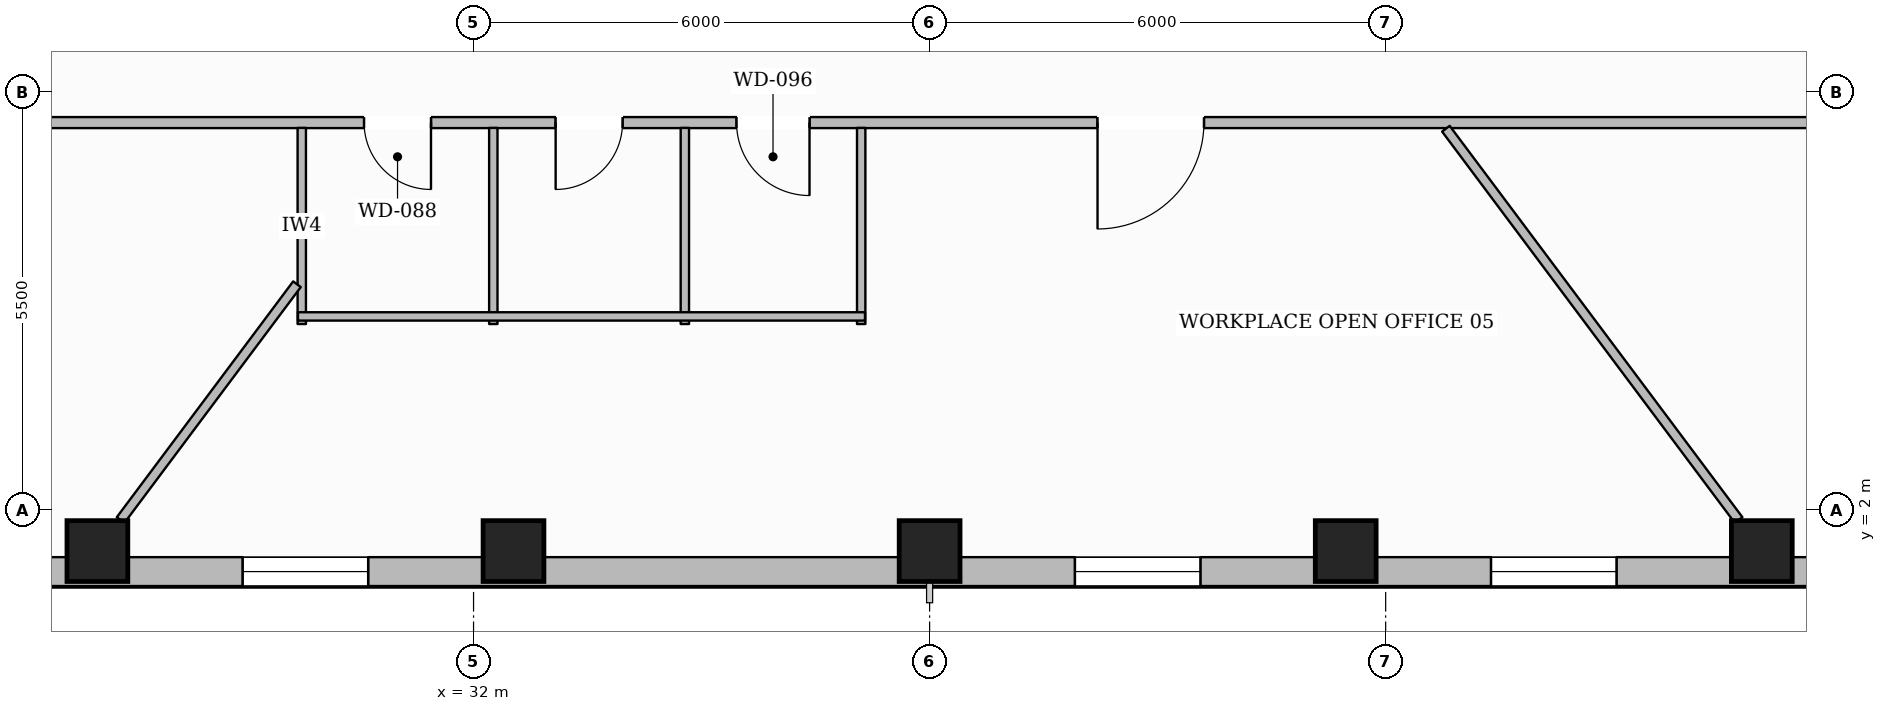
"""IFC4 building model, lengths in metres.
Left out: names, types, materials, properties, quantities, classifications, styles, units other than length and angle.
Written with IfcOpenShell. Run it as: python <this file> out.ifc"""

import sys

from ifc_helpers import new_model, si_unit, direction, frame, frame_2d, origin, origin_2d, place, context, subcontext, project, spatial, rectangle, hollow_rectangle, extrude, element, fill, save


model = new_model("IFC4")
c1 = context("Model", 3, precision=1e-05, world=origin(), true_north=direction((0.0, 1.0)))
c2 = subcontext(c1, "Body", "Model", "MODEL_VIEW")
j1 = project(units=[si_unit("LENGTHUNIT", "METRE"), si_unit("PLANEANGLEUNIT", "RADIAN")], contexts=[c1])
p1 = place(None, origin())
s1 = spatial("IfcSite", under=j1, at=p1, CompositionType="ELEMENT")
p2 = place(p1, origin())
s2 = spatial("IfcBuilding", under=s1, at=p2, CompositionType="ELEMENT")
p3 = place(p2, frame((0.0, 0.0, 25.25)))
s3 = spatial("IfcBuildingStorey", under=s2, at=p3, CompositionType="ELEMENT", Elevation=25.25)
for number, where, z_axis, x_axis in (
    (1, (27.051, 1.463, 0.0), (0.0, 0.0, 1.0), (1.0, 0.0, 0.0)),
    (2, (32.526, 1.463, 0.0), (0.0, 0.0, 1.0), (1.0, 0.0, 0.0)),
    (3, (38.0, 1.463, 0.0), (0.0, 0.0, 1.0), (1.0, 0.0, 0.0)),
    (4, (43.474, 1.463, 0.0), (0.0, 0.0, 1.0), (1.0, 0.0, 0.0)),
    (5, (48.949, 1.463, 0.0), (0.0, 0.0, 1.0), (1.0, 0.0, 0.0)),
):
    element("IfcColumn", number, at=place(p3, frame(where, z_axis=z_axis, x_axis=x_axis)), inside=s3, PredefinedType="COLUMN", context=c2, shape_type="SweptSolid", body=[
        extrude(hollow_rectangle(XDim=0.8, YDim=0.8, WallThickness=0.036, at=origin_2d()), origin(), (0.0, 0.0, 1.0), 3.59),
    ])
p4 = place(p3, frame((54.902, 1.193, 0.0), z_axis=(0.0, 0.0, 1.0), x_axis=(-1.0, 0.0, 0.0)))
e6 = element("IfcWall", 6, at=p4, inside=s3, PredefinedType="STANDARD", context=c2, shape_type="SweptSolid", body=[
    extrude(rectangle(XDim=33.804, YDim=0.38, at=frame_2d((16.902, 0.0))), origin(), (0.0, 0.0, 1.0), 2.97),
])
p5 = place(p4, frame((29.763, 0.0, 0.65)))
e7 = element("IfcOpeningElement", 7, at=p5, cuts=e6, PredefinedType="OPENING", context=c2, shape_type="SweptSolid", body=[
    extrude(rectangle(XDim=1.65, YDim=1.75, at=frame_2d((0.825, 0.875))), frame((0.0, 0.2, 0.0), z_axis=(0.0, -1.0, 0.0), x_axis=(1.0, 0.0, 0.0)), (0.0, 0.0, 1.0), 0.4),
])
p6 = place(p4, frame((24.288, 0.0, 0.65)))
e8 = element("IfcOpeningElement", 8, at=p6, cuts=e6, PredefinedType="OPENING", context=c2, shape_type="SweptSolid", body=[
    extrude(rectangle(XDim=1.65, YDim=1.75, at=frame_2d((0.825, 0.875))), frame((0.0, 0.2, 0.0), z_axis=(0.0, -1.0, 0.0), x_axis=(1.0, 0.0, 0.0)), (0.0, 0.0, 1.0), 0.4),
])
p7 = place(p4, frame((13.34, 0.0, 0.65)))
e9 = element("IfcOpeningElement", 9, at=p7, cuts=e6, PredefinedType="OPENING", context=c2, shape_type="SweptSolid", body=[
    extrude(rectangle(XDim=1.65, YDim=1.75, at=frame_2d((0.825, 0.875))), frame((0.0, 0.2, 0.0), z_axis=(0.0, -1.0, 0.0), x_axis=(1.0, 0.0, 0.0)), (0.0, 0.0, 1.0), 0.4),
])
p8 = place(p4, frame((7.865, 0.0, 0.65)))
e10 = element("IfcOpeningElement", 10, at=p8, cuts=e6, PredefinedType="OPENING", context=c2, shape_type="SweptSolid", body=[
    extrude(rectangle(XDim=1.65, YDim=1.75, at=frame_2d((0.825, 0.875))), frame((0.0, 0.2, 0.0), z_axis=(0.0, -1.0, 0.0), x_axis=(1.0, 0.0, 0.0)), (0.0, 0.0, 1.0), 0.4),
])
p9 = place(p4, frame((2.391, 0.0, 0.65)))
e11 = element("IfcOpeningElement", 11, at=p9, cuts=e6, PredefinedType="OPENING", context=c2, shape_type="SweptSolid", body=[
    extrude(rectangle(XDim=1.65, YDim=1.75, at=frame_2d((0.825, 0.875))), frame((0.0, 0.2, 0.0), z_axis=(0.0, -1.0, 0.0), x_axis=(1.0, 0.0, 0.0)), (0.0, 0.0, 1.0), 0.4),
])
p10 = place(p3, frame((49.92, 7.1, 0.0), z_axis=(0.0, 0.0, 1.0), x_axis=(-1.0, 0.0, 0.0)))
e12 = element("IfcWall", 12, at=p10, inside=s3, PredefinedType="PARTITIONING", context=c2, shape_type="SweptSolid", body=[
    extrude(rectangle(XDim=23.84, YDim=0.145, at=frame_2d((11.92, 0.0))), origin(), (0.0, 0.0, 1.0), 3.278),
])
p11 = place(p10, frame((18.48, 0.0, 0.0)))
e13 = element("IfcOpeningElement", 13, at=p11, cuts=e12, PredefinedType="OPENING", context=c2, shape_type="SweptSolid", body=[
    extrude(rectangle(XDim=0.88, YDim=2.1, at=frame_2d((0.44, 1.05))), frame((0.0, 0.083, 0.0), z_axis=(0.0, -1.0, 0.0), x_axis=(1.0, 0.0, 0.0)), (0.0, 0.0, 1.0), 0.165),
])
p12 = place(p10, frame((15.96, 0.0, 0.0)))
e14 = element("IfcOpeningElement", 14, at=p12, cuts=e12, PredefinedType="OPENING", context=c2, shape_type="SweptSolid", body=[
    extrude(rectangle(XDim=0.88, YDim=2.1, at=frame_2d((0.44, 1.05))), frame((0.0, 0.083, 0.0), z_axis=(0.0, -1.0, 0.0), x_axis=(1.0, 0.0, 0.0)), (0.0, 0.0, 1.0), 0.165),
])
p13 = place(p10, frame((13.5, 0.0, 0.0)))
e15 = element("IfcOpeningElement", 15, at=p13, cuts=e12, PredefinedType="OPENING", context=c2, shape_type="SweptSolid", body=[
    extrude(rectangle(XDim=0.96, YDim=2.1, at=frame_2d((0.48, 1.05))), frame((0.0, 0.083, 0.0), z_axis=(0.0, -1.0, 0.0), x_axis=(1.0, 0.0, 0.0)), (0.0, 0.0, 1.0), 0.165),
])
p14 = place(p10, frame((8.311, 0.0, 0.0)))
e16 = element("IfcOpeningElement", 16, at=p14, cuts=e12, PredefinedType="OPENING", context=c2, shape_type="SweptSolid", body=[
    extrude(rectangle(XDim=1.4, YDim=2.2, at=frame_2d((0.7, 1.1))), frame((0.0, 0.083, 0.0), z_axis=(0.0, -1.0, 0.0), x_axis=(1.0, 0.0, 0.0)), (0.0, 0.0, 1.0), 0.165),
])
for number, where, z_axis, x_axis in (
    (17, (29.74, 4.45, 0.0), (0.0, 0.0, 1.0), (0.0, 1.0, 0.0)),
    (18, (32.26, 4.45, 0.0), (0.0, 0.0, 1.0), (0.0, 1.0, 0.0)),
    (19, (34.78, 4.45, 0.0), (0.0, 0.0, 1.0), (0.0, 1.0, 0.0)),
    (20, (37.1, 4.45, 0.0), (0.0, 0.0, 1.0), (0.0, 1.0, 0.0)),
):
    element("IfcWall", number, at=place(p3, frame(where, z_axis=z_axis, x_axis=x_axis)), inside=s3, PredefinedType="PLUMBINGWALL", context=c2, shape_type="SweptSolid", body=[
        extrude(rectangle(XDim=2.58, YDim=0.11, at=frame_2d((1.29, 0.0))), origin(), (0.0, 0.0, 1.0), 3.59),
    ])
p15 = place(p3, frame((29.69, 4.55, 0.0), z_axis=(0.0, 0.0, 1.0), x_axis=(1.0, 0.0, 0.0)))
e21 = element("IfcWall", 21, at=p15, inside=s3, PredefinedType="PLUMBINGWALL", context=c2, shape_type="SweptSolid", body=[
    extrude(rectangle(XDim=7.46, YDim=0.11, at=frame_2d((3.73, 0.0))), origin(), (0.0, 0.0, 1.0), 3.59),
])
p16 = place(p3, frame((29.677, 4.973, 0.0), z_axis=(0.0, 0.0, 1.0), x_axis=(-0.598981151393, -0.800763123699, 0.0)))
e22 = element("IfcWall", 22, at=p16, inside=s3, PredefinedType="PARTITIONING", context=c2, shape_type="SweptSolid", body=[
    extrude(rectangle(XDim=3.874, YDim=0.125, at=frame_2d((1.937, 0.0))), origin(), (0.0, 0.0, 1.0), 3.59),
])
p17 = place(p3, frame((44.792, 7.02, 0.0), z_axis=(0.0, 0.0, 1.0), x_axis=(0.598984945208, -0.800760285863, 0.0)))
e23 = element("IfcWall", 23, at=p17, inside=s3, PredefinedType="PARTITIONING", context=c2, shape_type="SweptSolid", body=[
    extrude(rectangle(XDim=6.43, YDim=0.125, at=frame_2d((3.215, 0.0))), origin(), (0.0, 0.0, 1.0), 3.59),
])
p18 = place(p6, origin())
e24 = element("IfcWindow", 24, at=p18, inside=s3, PartitioningType="SINGLE_PANEL", PredefinedType="WINDOW", context=c2, shape_type="SweptSolid", body=[
    extrude(rectangle(XDim=1.65, YDim=1.75, at=frame_2d((0.825, 0.875))), frame((0.0, 0.03, 0.0), z_axis=(0.0, -1.0, 0.0), x_axis=(1.0, 0.0, 0.0)), (0.0, 0.0, 1.0), 0.06),
])
fill(e8, e24)
p19 = place(p7, origin())
e25 = element("IfcWindow", 25, at=p19, inside=s3, PartitioningType="SINGLE_PANEL", PredefinedType="WINDOW", context=c2, shape_type="SweptSolid", body=[
    extrude(rectangle(XDim=1.65, YDim=1.75, at=frame_2d((0.825, 0.875))), frame((0.0, 0.03, 0.0), z_axis=(0.0, -1.0, 0.0), x_axis=(1.0, 0.0, 0.0)), (0.0, 0.0, 1.0), 0.06),
])
fill(e9, e25)
p20 = place(p8, origin())
e26 = element("IfcWindow", 26, at=p20, inside=s3, PartitioningType="SINGLE_PANEL", PredefinedType="WINDOW", context=c2, shape_type="SweptSolid", body=[
    extrude(rectangle(XDim=1.65, YDim=1.75, at=frame_2d((0.825, 0.875))), frame((0.0, 0.03, 0.0), z_axis=(0.0, -1.0, 0.0), x_axis=(1.0, 0.0, 0.0)), (0.0, 0.0, 1.0), 0.06),
])
fill(e10, e26)
p21 = place(p11, origin())
e27 = element("IfcDoor", 27, at=p21, inside=s3, OperationType="SINGLE_SWING_LEFT", PredefinedType="DOOR", context=c2, shape_type="SweptSolid", body=[
    extrude(rectangle(XDim=0.88, YDim=2.1, at=frame_2d((0.44, 1.05))), frame((0.0, 0.025, 0.0), z_axis=(0.0, -1.0, 0.0), x_axis=(1.0, 0.0, 0.0)), (0.0, 0.0, 1.0), 0.05),
])
fill(e13, e27)
p22 = place(p12, origin())
e28 = element("IfcDoor", 28, at=p22, inside=s3, OperationType="SINGLE_SWING_RIGHT", PredefinedType="DOOR", context=c2, shape_type="SweptSolid", body=[
    extrude(rectangle(XDim=0.88, YDim=2.1, at=frame_2d((0.44, 1.05))), frame((0.0, 0.025, 0.0), z_axis=(0.0, -1.0, 0.0), x_axis=(1.0, 0.0, 0.0)), (0.0, 0.0, 1.0), 0.05),
])
fill(e14, e28)
p23 = place(p13, origin())
e29 = element("IfcDoor", 29, at=p23, inside=s3, OperationType="SINGLE_SWING_LEFT", PredefinedType="DOOR", context=c2, shape_type="SweptSolid", body=[
    extrude(rectangle(XDim=0.96, YDim=2.1, at=frame_2d((0.48, 1.05))), frame((0.0, 0.025, 0.0), z_axis=(0.0, -1.0, 0.0), x_axis=(1.0, 0.0, 0.0)), (0.0, 0.0, 1.0), 0.05),
])
fill(e15, e29)
p24 = place(p14, origin())
e30 = element("IfcDoor", 30, at=p24, inside=s3, OperationType="SINGLE_SWING_RIGHT", PredefinedType="DOOR", context=c2, shape_type="SweptSolid", body=[
    extrude(rectangle(XDim=1.4, YDim=2.2, at=frame_2d((0.7, 1.1))), frame((0.0, 0.025, 0.0), z_axis=(0.0, -1.0, 0.0), x_axis=(1.0, 0.0, 0.0)), (0.0, 0.0, 1.0), 0.05),
])
fill(e16, e30)
save(model, sys.argv[1])
